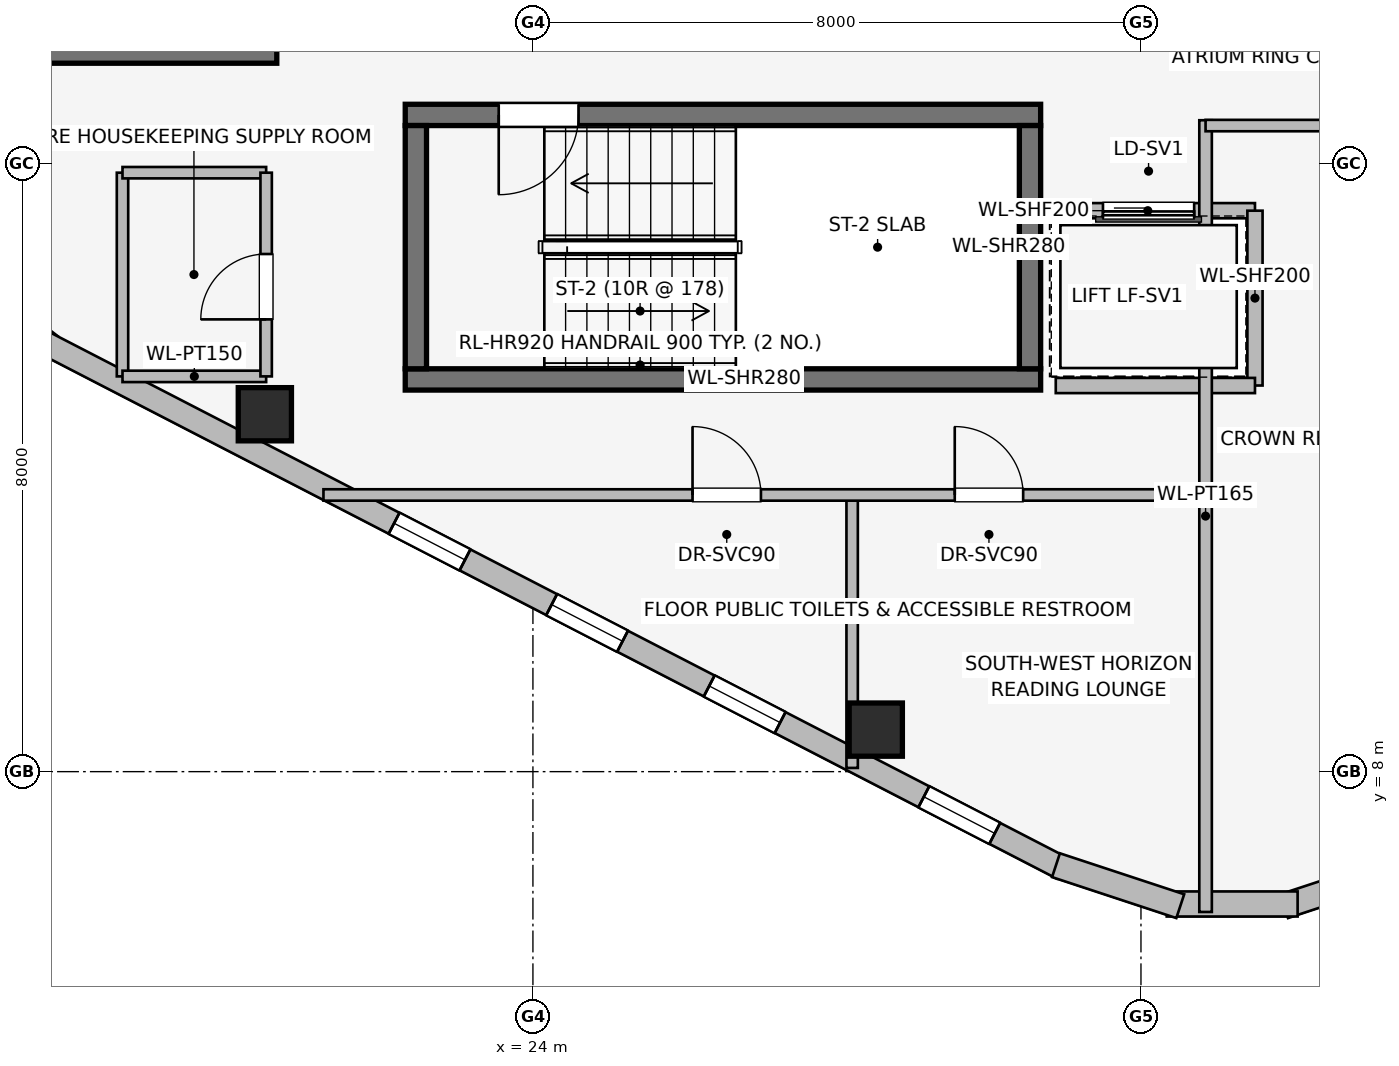
"""IFC4 building model, lengths in metres.
Left out: names, types, materials, properties, quantities, classifications, styles, units other than length and angle.
Written with IfcOpenShell. Run it as: python <this file> out.ifc"""

import sys

from ifc_helpers import new_model, si_unit, direction, frame, frame_2d, origin, origin_2d, place, context, subcontext, project, spatial, rectangle, extrude, element, fill, save


model = new_model("IFC4")
c1 = context("Model", 3, precision=1e-05, world=origin(), true_north=direction((0.0, 1.0)))
c2 = subcontext(c1, "Body", "Model", "MODEL_VIEW")
j1 = project(units=[si_unit("LENGTHUNIT", "METRE"), si_unit("PLANEANGLEUNIT", "RADIAN")], contexts=[c1])
p1 = place(None, origin())
s1 = spatial("IfcSite", under=j1, at=p1, CompositionType="ELEMENT")
p2 = place(p1, origin())
s2 = spatial("IfcBuilding", under=s1, at=p2, CompositionType="ELEMENT")
p3 = place(p2, frame((0.0, 0.0, 256.1)))
s3 = spatial("IfcBuildingStorey", under=s2, at=p3, CompositionType="ELEMENT", Elevation=256.1)
p4 = place(p3, frame((16.87, 17.46, 0.0), z_axis=(0.0, 0.0, 1.0), x_axis=(1.0, 0.0, 0.0)))
e1 = element("IfcWall", 1, at=p4, inside=s3, PredefinedType="SHEAR", context=c2, shape_type="SweptSolid", body=[
    extrude(rectangle(XDim=3.76, YDim=0.28, at=frame_2d((1.88, 0.0))), origin(), (0.0, 0.0, 1.0), 3.55),
])
p5 = place(p3, frame((22.32, 13.16, 0.0), z_axis=(0.0, 0.0, 1.0), x_axis=(1.0, 0.0, 0.0)))
e2 = element("IfcWall", 2, at=p5, inside=s3, PredefinedType="SHEAR", context=c2, shape_type="SweptSolid", body=[
    extrude(rectangle(XDim=8.36, YDim=0.28, at=frame_2d((4.18, 0.0))), origin(), (0.0, 0.0, 1.0), 3.55),
])
p6 = place(p3, frame((30.68, 16.64, 0.0), z_axis=(0.0, 0.0, 1.0), x_axis=(-1.0, 0.0, 0.0)))
e3 = element("IfcWall", 3, at=p6, inside=s3, PredefinedType="SHEAR", context=c2, shape_type="SweptSolid", body=[
    extrude(rectangle(XDim=8.36, YDim=0.28, at=frame_2d((4.18, 0.0))), origin(), (0.0, 0.0, 1.0), 3.55),
])
p7 = place(p6, frame((6.08, 0.0, 0.0)))
e4 = element("IfcOpeningElement", 4, at=p7, cuts=e3, PredefinedType="OPENING", context=c2, shape_type="SweptSolid", body=[
    extrude(rectangle(XDim=1.05, YDim=2.0, at=frame_2d((0.525, 1.0))), frame((0.0, 0.15, 0.0), z_axis=(0.0, -1.0, 0.0), x_axis=(1.0, 0.0, 0.0)), (0.0, 0.0, 1.0), 0.3),
])
for number, where, z_axis, x_axis in (
    (5, (22.46, 16.5, 0.0), (0.0, 0.0, 1.0), (0.0, -1.0, 0.0)),
    (6, (30.54, 13.3, 0.0), (0.0, 0.0, 1.0), (0.0, 1.0, 0.0)),
):
    element("IfcWall", number, at=place(p3, frame(where, z_axis=z_axis, x_axis=x_axis)), inside=s3, PredefinedType="SHEAR", context=c2, shape_type="SweptSolid", body=[
        extrude(rectangle(XDim=3.2, YDim=0.28, at=frame_2d((1.6, 0.0))), origin(), (0.0, 0.0, 1.0), 3.55),
    ])
for number, where, z_axis, x_axis in (
    (7, (20.473, 12.702, 0.0), (0.0, 0.0, 1.0), (1.0, 0.0, 0.0)),
    (8, (28.511, 8.553, 0.0), (0.0, 0.0, 1.0), (1.0, 0.0, 0.0)),
):
    element("IfcColumn", number, at=place(p3, frame(where, z_axis=z_axis, x_axis=x_axis)), inside=s3, PredefinedType="COLUMN", context=c2, shape_type="SweptSolid", body=[
        extrude(rectangle(XDim=0.7, YDim=0.7, at=origin_2d()), origin(), (0.0, 0.0, 1.0), 3.55),
    ])
p8 = place(p3, frame((17.647, 13.599, 0.0), z_axis=(0.0, 0.0, 1.0), x_axis=(-0.790691856293, 0.61221433207, 0.0)))
e9 = element("IfcWall", 9, at=p8, inside=s3, PredefinedType="STANDARD", context=c2, shape_type="SweptSolid", body=[
    extrude(rectangle(XDim=1.676, YDim=0.33, at=frame_2d((0.838, 0.0))), origin(), (0.0, 0.0, 1.0), 3.29),
])
p9 = place(p3, frame((30.963, 6.73, 0.0), z_axis=(0.0, 0.0, 1.0), x_axis=(-0.888581481622, 0.458718814218, 0.0)))
e10 = element("IfcWall", 10, at=p9, inside=s3, PredefinedType="STANDARD", context=c2, shape_type="SweptSolid", body=[
    extrude(rectangle(XDim=15.077, YDim=0.31, at=frame_2d((7.539, 0.0))), origin(), (0.0, 0.0, 1.0), 3.29),
])
p10 = place(p9, frame((0.998, 0.0, 0.75)))
e11 = element("IfcOpeningElement", 11, at=p10, cuts=e10, PredefinedType="OPENING", context=c2, shape_type="SweptSolid", body=[
    extrude(rectangle(XDim=1.05, YDim=1.4, at=frame_2d((0.525, 0.7))), frame((0.0, 0.165, 0.0), z_axis=(0.0, -1.0, 0.0), x_axis=(1.0, 0.0, 0.0)), (0.0, 0.0, 1.0), 0.33),
])
p11 = place(p9, frame((4.176, 0.0, 0.75)))
e12 = element("IfcOpeningElement", 12, at=p11, cuts=e10, PredefinedType="OPENING", context=c2, shape_type="SweptSolid", body=[
    extrude(rectangle(XDim=1.05, YDim=1.4, at=frame_2d((0.525, 0.7))), frame((0.0, 0.165, 0.0), z_axis=(0.0, -1.0, 0.0), x_axis=(1.0, 0.0, 0.0)), (0.0, 0.0, 1.0), 0.33),
])
p12 = place(p9, frame((6.509, 0.0, 0.75)))
e13 = element("IfcOpeningElement", 13, at=p12, cuts=e10, PredefinedType="OPENING", context=c2, shape_type="SweptSolid", body=[
    extrude(rectangle(XDim=1.05, YDim=1.4, at=frame_2d((0.525, 0.7))), frame((0.0, 0.165, 0.0), z_axis=(0.0, -1.0, 0.0), x_axis=(1.0, 0.0, 0.0)), (0.0, 0.0, 1.0), 0.33),
])
p13 = place(p9, frame((8.842, 0.0, 0.75)))
e14 = element("IfcOpeningElement", 14, at=p13, cuts=e10, PredefinedType="OPENING", context=c2, shape_type="SweptSolid", body=[
    extrude(rectangle(XDim=1.05, YDim=1.4, at=frame_2d((0.525, 0.7))), frame((0.0, 0.165, 0.0), z_axis=(0.0, -1.0, 0.0), x_axis=(1.0, 0.0, 0.0)), (0.0, 0.0, 1.0), 0.33),
])
p14 = place(p3, frame((35.518, 6.769, 0.0), z_axis=(0.0, 0.0, 1.0), x_axis=(-0.949713440491, -0.313120393699, 0.0)))
e15 = element("IfcWall", 15, at=p14, inside=s3, PredefinedType="STANDARD", context=c2, shape_type="SweptSolid", body=[
    extrude(rectangle(XDim=1.722, YDim=0.33, at=frame_2d((0.861, 0.0))), origin(), (0.0, 0.0, 1.0), 3.29),
])
p15 = place(p3, frame((34.061, 6.259, 0.0), z_axis=(0.0, 0.0, 1.0), x_axis=(-1.0, 0.0, 0.0)))
e16 = element("IfcWall", 16, at=p15, inside=s3, PredefinedType="STANDARD", context=c2, shape_type="SweptSolid", body=[
    extrude(rectangle(XDim=1.722, YDim=0.33, at=frame_2d((0.861, 0.0))), origin(), (0.0, 0.0, 1.0), 3.29),
])
p16 = place(p3, frame((32.517, 6.23, 0.0), z_axis=(0.0, 0.0, 1.0), x_axis=(-0.949713440491, 0.313120393699, 0.0)))
e17 = element("IfcWall", 17, at=p16, inside=s3, PredefinedType="STANDARD", context=c2, shape_type="SweptSolid", body=[
    extrude(rectangle(XDim=1.722, YDim=0.33, at=frame_2d((0.861, 0.0))), origin(), (0.0, 0.0, 1.0), 3.29),
])
p17 = place(p3, frame((33.5, 15.38, 0.0), z_axis=(0.0, 0.0, 1.0), x_axis=(-1.0, 0.0, 0.0)))
e18 = element("IfcWall", 18, at=p17, inside=s3, PredefinedType="PARTITIONING", context=c2, shape_type="SweptSolid", body=[
    extrude(rectangle(XDim=2.82, YDim=0.2, at=frame_2d((1.41, 0.0))), origin(), (0.0, 0.0, 1.0), 3.29),
])
p18 = place(p17, frame((0.8, 0.0, 0.0)))
e19 = element("IfcOpeningElement", 19, at=p18, cuts=e18, PredefinedType="OPENING", context=c2, shape_type="SweptSolid", body=[
    extrude(rectangle(XDim=1.2, YDim=2.2, at=frame_2d((0.6, 1.1))), frame((0.0, 0.11, 0.0), z_axis=(0.0, -1.0, 0.0), x_axis=(1.0, 0.0, 0.0)), (0.0, 0.0, 1.0), 0.22),
])
p19 = place(p3, frame((33.5, 13.08, 0.0), z_axis=(0.0, 0.0, 1.0), x_axis=(0.0, 1.0, 0.0)))
e20 = element("IfcWall", 20, at=p19, inside=s3, PredefinedType="PARTITIONING", context=c2, shape_type="SweptSolid", body=[
    extrude(rectangle(XDim=2.3, YDim=0.2, at=frame_2d((1.15, 0.0))), origin(), (0.0, 0.0, 1.0), 3.29),
])
p20 = place(p3, frame((30.879, 13.08, 0.0), z_axis=(0.0, 0.0, 1.0), x_axis=(1.0, 0.0, 0.0)))
e21 = element("IfcWall", 21, at=p20, inside=s3, PredefinedType="PARTITIONING", context=c2, shape_type="SweptSolid", body=[
    extrude(rectangle(XDim=2.621, YDim=0.2, at=frame_2d((1.311, 0.0))), origin(), (0.0, 0.0, 1.0), 3.29),
])
p21 = place(p3, frame((18.6, 15.88, 0.0), z_axis=(0.0, 0.0, 1.0), x_axis=(0.0, -1.0, 0.0)))
e22 = element("IfcWall", 22, at=p21, inside=s3, PredefinedType="PARTITIONING", context=c2, shape_type="SweptSolid", body=[
    extrude(rectangle(XDim=2.68, YDim=0.15, at=frame_2d((1.34, 0.0))), origin(), (0.0, 0.0, 1.0), 3.29),
])
for number, where, z_axis, x_axis in (
    (23, (18.6, 13.2, 0.0), (0.0, 0.0, 1.0), (1.0, 0.0, 0.0)),
    (24, (18.6, 15.88, 0.0), (0.0, 0.0, 1.0), (1.0, 0.0, 0.0)),
):
    element("IfcWall", number, at=place(p3, frame(where, z_axis=z_axis, x_axis=x_axis)), inside=s3, PredefinedType="PARTITIONING", context=c2, shape_type="SweptSolid", body=[
        extrude(rectangle(XDim=1.89, YDim=0.15, at=frame_2d((0.945, 0.0))), origin(), (0.0, 0.0, 1.0), 3.29),
    ])
p22 = place(p3, frame((20.49, 13.2, 0.0), z_axis=(0.0, 0.0, 1.0), x_axis=(0.0, 1.0, 0.0)))
e25 = element("IfcWall", 25, at=p22, inside=s3, PredefinedType="PARTITIONING", context=c2, shape_type="SweptSolid", body=[
    extrude(rectangle(XDim=2.68, YDim=0.15, at=frame_2d((1.34, 0.0))), origin(), (0.0, 0.0, 1.0), 3.29),
])
p23 = place(p22, frame((0.75, 0.0, 0.0)))
e26 = element("IfcOpeningElement", 26, at=p23, cuts=e25, PredefinedType="OPENING", context=c2, shape_type="SweptSolid", body=[
    extrude(rectangle(XDim=0.86, YDim=2.0, at=frame_2d((0.43, 1.0))), frame((0.0, 0.085, 0.0), z_axis=(0.0, -1.0, 0.0), x_axis=(1.0, 0.0, 0.0)), (0.0, 0.0, 1.0), 0.17),
])
p24 = place(p3, frame((32.85, 6.154, 0.0), z_axis=(0.0, 0.0, 1.0), x_axis=(0.0, 1.0, 0.0)))
e27 = element("IfcWall", 27, at=p24, inside=s3, PredefinedType="PARTITIONING", context=c2, shape_type="SweptSolid", body=[
    extrude(rectangle(XDim=10.416, YDim=0.165, at=frame_2d((5.208, 0.0))), origin(), (0.0, 0.0, 1.0), 3.29),
])
p25 = place(p3, frame((28.2, 8.049, 0.0), z_axis=(0.0, 0.0, 1.0), x_axis=(0.0, 1.0, 0.0)))
e28 = element("IfcWall", 28, at=p25, inside=s3, PredefinedType="PARTITIONING", context=c2, shape_type="SweptSolid", body=[
    extrude(rectangle(XDim=3.591, YDim=0.15, at=frame_2d((1.795, 0.0))), origin(), (0.0, 0.0, 1.0), 3.29),
])
p26 = place(p3, frame((21.244, 11.64, 0.0), z_axis=(0.0, 0.0, 1.0), x_axis=(1.0, 0.0, 0.0)))
e29 = element("IfcWall", 29, at=p26, inside=s3, PredefinedType="PARTITIONING", context=c2, shape_type="SweptSolid", body=[
    extrude(rectangle(XDim=11.606, YDim=0.15, at=frame_2d((5.803, 0.0))), origin(), (0.0, 0.0, 1.0), 2.833),
])
p27 = place(p26, frame((4.856, 0.0, 0.0)))
e30 = element("IfcOpeningElement", 30, at=p27, cuts=e29, PredefinedType="OPENING", context=c2, shape_type="SweptSolid", body=[
    extrude(rectangle(XDim=0.9, YDim=2.0, at=frame_2d((0.45, 1.0))), frame((0.0, 0.085, 0.0), z_axis=(0.0, -1.0, 0.0), x_axis=(1.0, 0.0, 0.0)), (0.0, 0.0, 1.0), 0.17),
])
p28 = place(p26, frame((8.306, 0.0, 0.0)))
e31 = element("IfcOpeningElement", 31, at=p28, cuts=e29, PredefinedType="OPENING", context=c2, shape_type="SweptSolid", body=[
    extrude(rectangle(XDim=0.9, YDim=2.0, at=frame_2d((0.45, 1.0))), frame((0.0, 0.085, 0.0), z_axis=(0.0, -1.0, 0.0), x_axis=(1.0, 0.0, 0.0)), (0.0, 0.0, 1.0), 0.17),
])
p29 = place(p3, frame((32.85, 16.5, 0.0), z_axis=(0.0, 0.0, 1.0), x_axis=(1.0, 0.0, 0.0)))
e32 = element("IfcWall", 32, at=p29, inside=s3, PredefinedType="PARTITIONING", context=c2, shape_type="SweptSolid", body=[
    extrude(rectangle(XDim=8.61, YDim=0.15, at=frame_2d((4.305, 0.0))), origin(), (0.0, 0.0, 1.0), 3.29),
])
p30 = place(p29, frame((3.825, 0.0, 0.0)))
e33 = element("IfcOpeningElement", 33, at=p30, cuts=e32, PredefinedType="OPENING", context=c2, shape_type="SweptSolid", body=[
    extrude(rectangle(XDim=0.96, YDim=2.0, at=frame_2d((0.48, 1.0))), frame((0.0, 0.085, 0.0), z_axis=(0.0, -1.0, 0.0), x_axis=(1.0, 0.0, 0.0)), (0.0, 0.0, 1.0), 0.17),
])
p31 = place(p10, origin())
e34 = element("IfcWindow", 34, at=p31, inside=s3, PartitioningType="SINGLE_PANEL", PredefinedType="WINDOW", context=c2, shape_type="SweptSolid", body=[
    extrude(rectangle(XDim=1.05, YDim=1.4, at=frame_2d((0.525, 0.7))), frame((0.0, 0.03, 0.0), z_axis=(0.0, -1.0, 0.0), x_axis=(1.0, 0.0, 0.0)), (0.0, 0.0, 1.0), 0.06),
])
fill(e11, e34)
p32 = place(p11, origin())
e35 = element("IfcWindow", 35, at=p32, inside=s3, PartitioningType="SINGLE_PANEL", PredefinedType="WINDOW", context=c2, shape_type="SweptSolid", body=[
    extrude(rectangle(XDim=1.05, YDim=1.4, at=frame_2d((0.525, 0.7))), frame((0.0, 0.03, 0.0), z_axis=(0.0, -1.0, 0.0), x_axis=(1.0, 0.0, 0.0)), (0.0, 0.0, 1.0), 0.06),
])
fill(e12, e35)
p33 = place(p12, origin())
e36 = element("IfcWindow", 36, at=p33, inside=s3, PartitioningType="SINGLE_PANEL", PredefinedType="WINDOW", context=c2, shape_type="SweptSolid", body=[
    extrude(rectangle(XDim=1.05, YDim=1.4, at=frame_2d((0.525, 0.7))), frame((0.0, 0.03, 0.0), z_axis=(0.0, -1.0, 0.0), x_axis=(1.0, 0.0, 0.0)), (0.0, 0.0, 1.0), 0.06),
])
fill(e13, e36)
p34 = place(p13, origin())
e37 = element("IfcWindow", 37, at=p34, inside=s3, PartitioningType="SINGLE_PANEL", PredefinedType="WINDOW", context=c2, shape_type="SweptSolid", body=[
    extrude(rectangle(XDim=1.05, YDim=1.4, at=frame_2d((0.525, 0.7))), frame((0.0, 0.03, 0.0), z_axis=(0.0, -1.0, 0.0), x_axis=(1.0, 0.0, 0.0)), (0.0, 0.0, 1.0), 0.06),
])
fill(e14, e37)
p35 = place(p7, origin())
e38 = element("IfcDoor", 38, at=p35, inside=s3, OperationType="SINGLE_SWING_RIGHT", PredefinedType="DOOR", context=c2, shape_type="SweptSolid", body=[
    extrude(rectangle(XDim=1.05, YDim=2.0, at=frame_2d((0.525, 1.0))), frame((0.0, 0.025, 0.0), z_axis=(0.0, -1.0, 0.0), x_axis=(1.0, 0.0, 0.0)), (0.0, 0.0, 1.0), 0.05),
])
fill(e4, e38)
p36 = place(p18, origin())
e39 = element("IfcDoor", 39, at=p36, inside=s3, OperationType="SLIDING_TO_RIGHT", PredefinedType="DOOR", context=c2, shape_type="SweptSolid", body=[
    extrude(rectangle(XDim=1.2, YDim=2.2, at=frame_2d((0.6, 1.1))), frame((0.0, 0.025, 0.0), z_axis=(0.0, -1.0, 0.0), x_axis=(1.0, 0.0, 0.0)), (0.0, 0.0, 1.0), 0.05),
])
fill(e19, e39)
p37 = place(p23, origin())
e40 = element("IfcDoor", 40, at=p37, inside=s3, OperationType="SINGLE_SWING_LEFT", PredefinedType="DOOR", context=c2, shape_type="SweptSolid", body=[
    extrude(rectangle(XDim=0.86, YDim=2.0, at=frame_2d((0.43, 1.0))), frame((0.0, 0.025, 0.0), z_axis=(0.0, -1.0, 0.0), x_axis=(1.0, 0.0, 0.0)), (0.0, 0.0, 1.0), 0.05),
])
fill(e26, e40)
p38 = place(p27, origin())
e41 = element("IfcDoor", 41, at=p38, inside=s3, OperationType="SINGLE_SWING_LEFT", PredefinedType="DOOR", context=c2, shape_type="SweptSolid", body=[
    extrude(rectangle(XDim=0.9, YDim=2.0, at=frame_2d((0.45, 1.0))), frame((0.0, 0.025, 0.0), z_axis=(0.0, -1.0, 0.0), x_axis=(1.0, 0.0, 0.0)), (0.0, 0.0, 1.0), 0.05),
])
fill(e30, e41)
p39 = place(p28, origin())
e42 = element("IfcDoor", 42, at=p39, inside=s3, OperationType="SINGLE_SWING_LEFT", PredefinedType="DOOR", context=c2, shape_type="SweptSolid", body=[
    extrude(rectangle(XDim=0.9, YDim=2.0, at=frame_2d((0.45, 1.0))), frame((0.0, 0.025, 0.0), z_axis=(0.0, -1.0, 0.0), x_axis=(1.0, 0.0, 0.0)), (0.0, 0.0, 1.0), 0.05),
])
fill(e31, e42)
save(model, sys.argv[1])
